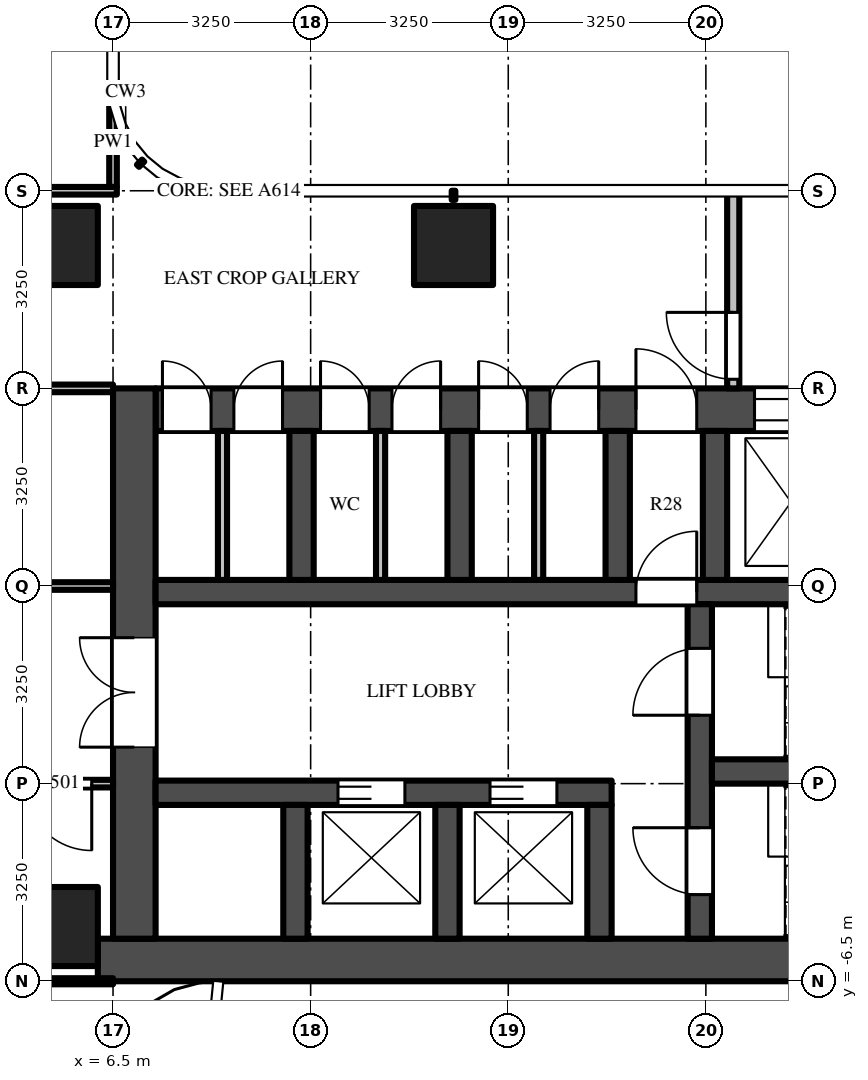
"""IFC4 building model, lengths in metres.
Left out: names, types, materials, properties, quantities, classifications, styles, units other than length and angle.
Written with IfcOpenShell. Run it as: python <this file> out.ifc"""

import sys

from ifc_helpers import new_model, si_unit, direction, frame, frame_2d, origin, origin_2d, place, context, subcontext, project, spatial, rectangle, extrude, source, transform, mapped, element, fill, save


model = new_model("IFC4")
c1 = context("Model", 3, precision=1e-05, world=origin(), true_north=direction((0.0, 1.0)))
c2 = subcontext(c1, "Body", "Model", "MODEL_VIEW")
j1 = project(units=[si_unit("LENGTHUNIT", "METRE"), si_unit("PLANEANGLEUNIT", "RADIAN")], contexts=[c1])
p1 = place(None, origin())
s1 = spatial("IfcSite", under=j1, at=p1, CompositionType="ELEMENT")
p2 = place(p1, origin())
s2 = spatial("IfcBuilding", under=s1, at=p2, CompositionType="ELEMENT")
p3 = place(p2, frame((0.0, 0.0, 111.0)))
s3 = spatial("IfcBuildingStorey", under=s2, at=p3, CompositionType="ELEMENT", Elevation=111.0)
m1 = source(origin(), c2, "Body", "SweptSolid", [
    extrude(rectangle(XDim=1.3, YDim=1.3, at=origin_2d()), origin(), (0.0, 0.0, 1.0), 4.5),
])
for number, where, z_axis, x_axis in (
    (1, (12.1, 5.6, 0.0), (0.0, 0.0, 1.0), (1.0, 0.0, 0.0)),
    (2, (5.6, 5.6, 0.0), (0.0, 0.0, 1.0), (1.0, 0.0, 0.0)),
    (3, (5.6, -5.6, 0.0), (0.0, 0.0, 1.0), (1.0, 0.0, 0.0)),
):
    element("IfcColumn", number, at=place(p3, frame(where, z_axis=z_axis, x_axis=x_axis)), inside=s3, PredefinedType="COLUMN", context=c2, shape_type="MappedRepresentation", body=[
        mapped(m1, transform((0.0, 0.0, 0.0))),
    ])
m2 = source(origin(), c2, "Body", "SweptSolid", [
    extrude(rectangle(XDim=16.5, YDim=0.7, at=frame_2d((8.25, 0.0))), origin(), (0.0, 0.0, 1.0), 4.25),
])
p4 = place(p3, frame((6.25, -6.15, 0.0), z_axis=(0.0, 0.0, 1.0), x_axis=(1.0, 0.0, 0.0)))
e4 = element("IfcWall", 4, at=p4, inside=s3, PredefinedType="SHEAR", context=c2, shape_type="MappedRepresentation", body=[
    mapped(m2, transform((0.0, 0.0, 0.0))),
])
m3 = source(origin(), c2, "Body", "SweptSolid", [
    extrude(rectangle(XDim=14.85, YDim=0.7, at=frame_2d((7.425, 0.0))), origin(), (0.0, 0.0, 1.0), 4.25),
])
p5 = place(p3, frame((7.2, 2.9, 0.0), z_axis=(0.0, 0.0, 1.0), x_axis=(1.0, 0.0, 0.0)))
e5 = element("IfcWall", 5, at=p5, inside=s3, PredefinedType="SHEAR", context=c2, shape_type="MappedRepresentation", body=[
    mapped(m3, transform((0.0, 0.0, 0.0))),
])
m4 = source(origin(), c2, "Body", "SweptSolid", [
    extrude(rectangle(XDim=1.3, YDim=2.1, at=frame_2d((0.65, 1.05))), frame((0.0, 0.36, 0.0), z_axis=(0.0, -1.0, 0.0), x_axis=(1.0, 0.0, 0.0)), (0.0, 0.0, 1.0), 0.72),
])
p6 = place(p5, frame((12.2, 0.0, 0.0)))
e6 = element("IfcOpeningElement", 6, at=p6, cuts=e5, PredefinedType="OPENING", context=c2, shape_type="MappedRepresentation", body=[
    mapped(m4, transform((0.0, 0.0, 0.0))),
])
m5 = source(origin(), c2, "Body", "SweptSolid", [
    extrude(rectangle(XDim=1.2, YDim=2.1, at=frame_2d((0.6, 1.05))), frame((0.0, 0.36, 0.0), z_axis=(0.0, -1.0, 0.0), x_axis=(1.0, 0.0, 0.0)), (0.0, 0.0, 1.0), 0.72),
])
p7 = place(p5, frame((9.85, 0.0, 0.0)))
e7 = element("IfcOpeningElement", 7, at=p7, cuts=e5, PredefinedType="OPENING", context=c2, shape_type="MappedRepresentation", body=[
    mapped(m5, transform((0.0, 0.0, 0.0))),
])
m6 = source(origin(), c2, "Body", "SweptSolid", [
    extrude(rectangle(XDim=1.0, YDim=2.1, at=frame_2d((0.5, 1.05))), frame((0.0, 0.36, 0.0), z_axis=(0.0, -1.0, 0.0), x_axis=(1.0, 0.0, 0.0)), (0.0, 0.0, 1.0), 0.72),
])
p8 = place(p5, frame((7.9, 0.0, 0.0)))
e8 = element("IfcOpeningElement", 8, at=p8, cuts=e5, PredefinedType="OPENING", context=c2, shape_type="MappedRepresentation", body=[
    mapped(m6, transform((0.0, 0.0, 0.0))),
])
m7 = source(origin(), c2, "Body", "SweptSolid", [
    extrude(rectangle(XDim=0.8, YDim=2.1, at=frame_2d((0.4, 1.05))), frame((0.0, 0.36, 0.0), z_axis=(0.0, -1.0, 0.0), x_axis=(1.0, 0.0, 0.0)), (0.0, 0.0, 1.0), 0.72),
])
p9 = place(p5, frame((0.113, 0.0, 0.0)))
e9 = element("IfcOpeningElement", 9, at=p9, cuts=e5, PredefinedType="OPENING", context=c2, shape_type="MappedRepresentation", body=[
    mapped(m7, transform((0.0, 0.0, 0.0))),
])
p10 = place(p5, frame((1.288, 0.0, 0.0)))
e10 = element("IfcOpeningElement", 10, at=p10, cuts=e5, PredefinedType="OPENING", context=c2, shape_type="MappedRepresentation", body=[
    mapped(m7, transform((0.0, 0.0, 0.0))),
])
p11 = place(p5, frame((2.712, 0.0, 0.0)))
e11 = element("IfcOpeningElement", 11, at=p11, cuts=e5, PredefinedType="OPENING", context=c2, shape_type="MappedRepresentation", body=[
    mapped(m7, transform((0.0, 0.0, 0.0))),
])
p12 = place(p5, frame((3.887, 0.0, 0.0)))
e12 = element("IfcOpeningElement", 12, at=p12, cuts=e5, PredefinedType="OPENING", context=c2, shape_type="MappedRepresentation", body=[
    mapped(m7, transform((0.0, 0.0, 0.0))),
])
p13 = place(p5, frame((5.312, 0.0, 0.0)))
e13 = element("IfcOpeningElement", 13, at=p13, cuts=e5, PredefinedType="OPENING", context=c2, shape_type="MappedRepresentation", body=[
    mapped(m7, transform((0.0, 0.0, 0.0))),
])
p14 = place(p5, frame((6.488, 0.0, 0.0)))
e14 = element("IfcOpeningElement", 14, at=p14, cuts=e5, PredefinedType="OPENING", context=c2, shape_type="MappedRepresentation", body=[
    mapped(m7, transform((0.0, 0.0, 0.0))),
])
m8 = source(origin(), c2, "Body", "SweptSolid", [
    extrude(rectangle(XDim=9.05, YDim=0.7, at=frame_2d((4.525, 0.0))), origin(), (0.0, 0.0, 1.0), 4.25),
])
p15 = place(p3, frame((6.85, -5.8, 0.0), z_axis=(0.0, 0.0, 1.0), x_axis=(0.0, 1.0, 0.0)))
e15 = element("IfcWall", 15, at=p15, inside=s3, PredefinedType="SHEAR", context=c2, shape_type="MappedRepresentation", body=[
    mapped(m8, transform((0.0, 0.0, 0.0))),
])
m9 = source(origin(), c2, "Body", "SweptSolid", [
    extrude(rectangle(XDim=1.8, YDim=2.1, at=frame_2d((0.9, 1.05))), frame((0.0, 0.36, 0.0), z_axis=(0.0, -1.0, 0.0), x_axis=(1.0, 0.0, 0.0)), (0.0, 0.0, 1.0), 0.72),
])
p16 = place(p15, frame((3.15, 0.0, 0.0)))
e16 = element("IfcOpeningElement", 16, at=p16, cuts=e15, PredefinedType="OPENING", context=c2, shape_type="MappedRepresentation", body=[
    mapped(m9, transform((0.0, 0.0, 0.0))),
])
m10 = source(origin(), c2, "Body", "SweptSolid", [
    extrude(rectangle(XDim=7.5, YDim=0.4, at=frame_2d((3.75, 0.0))), origin(), (0.0, 0.0, 1.0), 4.25),
])
p17 = place(p3, frame((7.2, -3.4, 0.0), z_axis=(0.0, 0.0, 1.0), x_axis=(1.0, 0.0, 0.0)))
e17 = element("IfcWall", 17, at=p17, inside=s3, PredefinedType="SHEAR", context=c2, shape_type="MappedRepresentation", body=[
    mapped(m10, transform((0.0, 0.0, 0.0))),
])
m11 = source(origin(), c2, "Body", "SweptSolid", [
    extrude(rectangle(XDim=1.1, YDim=2.1, at=frame_2d((0.55, 1.05))), frame((0.0, 0.21, 0.0), z_axis=(0.0, -1.0, 0.0), x_axis=(1.0, 0.0, 0.0)), (0.0, 0.0, 1.0), 0.42),
])
p18 = place(p17, frame((3.0, 0.0, 0.0)))
e18 = element("IfcOpeningElement", 18, at=p18, cuts=e17, PredefinedType="OPENING", context=c2, shape_type="MappedRepresentation", body=[
    mapped(m11, transform((0.0, 0.0, 0.0))),
])
p19 = place(p17, frame((5.5, 0.0, 0.0)))
e19 = element("IfcOpeningElement", 19, at=p19, cuts=e17, PredefinedType="OPENING", context=c2, shape_type="MappedRepresentation", body=[
    mapped(m11, transform((0.0, 0.0, 0.0))),
])
m12 = source(origin(), c2, "Body", "SweptSolid", [
    extrude(rectangle(XDim=14.85, YDim=0.4, at=frame_2d((7.425, 0.0))), origin(), (0.0, 0.0, 1.0), 4.25),
])
p20 = place(p3, frame((7.2, -0.1, 0.0), z_axis=(0.0, 0.0, 1.0), x_axis=(1.0, 0.0, 0.0)))
e20 = element("IfcWall", 20, at=p20, inside=s3, PredefinedType="SHEAR", context=c2, shape_type="MappedRepresentation", body=[
    mapped(m12, transform((0.0, 0.0, 0.0))),
])
m13 = source(origin(), c2, "Body", "SweptSolid", [
    extrude(rectangle(XDim=1.0, YDim=2.1, at=frame_2d((0.5, 1.05))), frame((0.0, 0.21, 0.0), z_axis=(0.0, -1.0, 0.0), x_axis=(1.0, 0.0, 0.0)), (0.0, 0.0, 1.0), 0.42),
])
p21 = place(p20, frame((7.9, 0.0, 0.0)))
e21 = element("IfcOpeningElement", 21, at=p21, cuts=e20, PredefinedType="OPENING", context=c2, shape_type="MappedRepresentation", body=[
    mapped(m13, transform((0.0, 0.0, 0.0))),
])
m14 = source(origin(), c2, "Body", "SweptSolid", [
    extrude(rectangle(XDim=5.5, YDim=0.4, at=frame_2d((2.75, 0.0))), origin(), (0.0, 0.0, 1.0), 4.25),
])
p22 = place(p3, frame((16.15, -5.8, 0.0), z_axis=(0.0, 0.0, 1.0), x_axis=(0.0, 1.0, 0.0)))
e22 = element("IfcWall", 22, at=p22, inside=s3, PredefinedType="SHEAR", context=c2, shape_type="MappedRepresentation", body=[
    mapped(m14, transform((0.0, 0.0, 0.0))),
])
p23 = place(p22, frame((0.725, 0.0, 0.0)))
e23 = element("IfcOpeningElement", 23, at=p23, cuts=e22, PredefinedType="OPENING", context=c2, shape_type="MappedRepresentation", body=[
    mapped(m11, transform((0.0, 0.0, 0.0))),
])
p24 = place(p22, frame((3.675, 0.0, 0.0)))
e24 = element("IfcOpeningElement", 24, at=p24, cuts=e22, PredefinedType="OPENING", context=c2, shape_type="MappedRepresentation", body=[
    mapped(m11, transform((0.0, 0.0, 0.0))),
])
m15 = source(origin(), c2, "Body", "SweptSolid", [
    extrude(rectangle(XDim=5.7, YDim=0.4, at=frame_2d((2.85, 0.0))), origin(), (0.0, 0.0, 1.0), 4.25),
])
p25 = place(p3, frame((16.35, -3.05, 0.0), z_axis=(0.0, 0.0, 1.0), x_axis=(1.0, 0.0, 0.0)))
e25 = element("IfcWall", 25, at=p25, inside=s3, PredefinedType="SHEAR", context=c2, shape_type="MappedRepresentation", body=[
    mapped(m15, transform((0.0, 0.0, 0.0))),
])
m16 = source(origin(), c2, "Body", "SweptSolid", [
    extrude(rectangle(XDim=2.2, YDim=0.4, at=frame_2d((1.1, 0.0))), origin(), (0.0, 0.0, 1.0), 4.25),
])
for number, where, z_axis, x_axis in (
    (26, (9.5, -5.8, 0.0), (0.0, 0.0, 1.0), (0.0, 1.0, 0.0)),
    (27, (12.0, -5.8, 0.0), (0.0, 0.0, 1.0), (0.0, 1.0, 0.0)),
    (28, (14.5, -5.8, 0.0), (0.0, 0.0, 1.0), (0.0, 1.0, 0.0)),
):
    element("IfcWall", number, at=place(p3, frame(where, z_axis=z_axis, x_axis=x_axis)), inside=s3, PredefinedType="SHEAR", context=c2, shape_type="MappedRepresentation", body=[
        mapped(m16, transform((0.0, 0.0, 0.0))),
    ])
m17 = source(origin(), c2, "Body", "SweptSolid", [
    extrude(rectangle(XDim=2.45, YDim=0.4, at=frame_2d((1.225, 0.0))), origin(), (0.0, 0.0, 1.0), 4.25),
])
for number, where, z_axis, x_axis in (
    (29, (9.6, 0.1, 0.0), (0.0, 0.0, 1.0), (0.0, 1.0, 0.0)),
    (30, (12.2, 0.1, 0.0), (0.0, 0.0, 1.0), (0.0, 1.0, 0.0)),
    (31, (14.8, 0.1, 0.0), (0.0, 0.0, 1.0), (0.0, 1.0, 0.0)),
    (32, (16.4, 0.1, 0.0), (0.0, 0.0, 1.0), (0.0, 1.0, 0.0)),
):
    element("IfcWall", number, at=place(p3, frame(where, z_axis=z_axis, x_axis=x_axis)), inside=s3, PredefinedType="SHEAR", context=c2, shape_type="MappedRepresentation", body=[
        mapped(m17, transform((0.0, 0.0, 0.0))),
    ])
m18 = source(origin(), c2, "Body", "SweptSolid", [
    extrude(rectangle(XDim=3.25, YDim=0.2, at=frame_2d((1.625, 0.0))), origin(), (0.0, 0.0, 1.0), 4.25),
])
p26 = place(p3, frame((16.7, 3.25, 0.0), z_axis=(0.0, 0.0, 1.0), x_axis=(0.0, 1.0, 0.0)))
e33 = element("IfcWall", 33, at=p26, inside=s3, PredefinedType="PARTITIONING", context=c2, shape_type="MappedRepresentation", body=[
    mapped(m18, transform((0.0, 0.0, 0.0))),
])
m19 = source(origin(), c2, "Body", "SweptSolid", [
    extrude(rectangle(XDim=1.1, YDim=2.1, at=frame_2d((0.55, 1.05))), frame((0.0, 0.11, 0.0), z_axis=(0.0, -1.0, 0.0), x_axis=(1.0, 0.0, 0.0)), (0.0, 0.0, 1.0), 0.22),
])
p27 = place(p26, frame((0.15, 0.0, 0.0)))
e34 = element("IfcOpeningElement", 34, at=p27, cuts=e33, PredefinedType="OPENING", context=c2, shape_type="MappedRepresentation", body=[
    mapped(m19, transform((0.0, 0.0, 0.0))),
])
m20 = source(origin(), c2, "Body", "SweptSolid", [
    extrude(rectangle(XDim=2.45, YDim=0.15, at=frame_2d((1.225, 0.0))), origin(), (0.0, 0.0, 1.0), 4.25),
])
for number, where, z_axis, x_axis in (
    (35, (8.3, 0.1, 0.0), (0.0, 0.0, 1.0), (0.0, 1.0, 0.0)),
    (36, (10.9, 0.1, 0.0), (0.0, 0.0, 1.0), (0.0, 1.0, 0.0)),
    (37, (13.5, 0.1, 0.0), (0.0, 0.0, 1.0), (0.0, 1.0, 0.0)),
):
    element("IfcWall", number, at=place(p3, frame(where, z_axis=z_axis, x_axis=x_axis)), inside=s3, PredefinedType="PARTITIONING", context=c2, shape_type="MappedRepresentation", body=[
        mapped(m20, transform((0.0, 0.0, 0.0))),
    ])
m21 = source(origin(), c2, "Body", "SweptSolid", [
    extrude(rectangle(XDim=1.469, YDim=0.125, at=frame_2d((0.734, 0.0))), origin(), (0.0, 0.0, 1.0), 4.25),
])
p28 = place(p3, frame((6.5, 6.562, 0.0), z_axis=(0.0, 0.0, 1.0), x_axis=(0.0, 1.0, 0.0)))
e38 = element("IfcWall", 38, at=p28, inside=s3, PredefinedType="PARTITIONING", context=c2, shape_type="MappedRepresentation", body=[
    mapped(m21, transform((0.0, 0.0, 0.0))),
])
m22 = source(origin(), c2, "Body", "SweptSolid", [
    extrude(rectangle(XDim=5.238, YDim=0.1, at=frame_2d((2.619, 0.0))), origin(), (0.0, 0.0, 1.0), 3.33),
])
p29 = place(p3, frame((1.262, -6.5, 0.0), z_axis=(0.0, 0.0, 1.0), x_axis=(1.0, 0.0, 0.0)))
e39 = element("IfcWall", 39, at=p29, inside=s3, PredefinedType="PARTITIONING", context=c2, shape_type="MappedRepresentation", body=[
    mapped(m22, transform((0.0, 0.0, 0.0))),
])
m23 = source(origin(), c2, "Body", "SweptSolid", [
    extrude(rectangle(XDim=5.363, YDim=0.125, at=frame_2d((2.681, 0.0))), origin(), (0.0, 0.0, 1.0), 3.468),
])
p30 = place(p3, frame((6.5, -3.25, 0.0), z_axis=(0.0, 0.0, 1.0), x_axis=(-1.0, 0.0, 0.0)))
e40 = element("IfcWall", 40, at=p30, inside=s3, PredefinedType="PARTITIONING", context=c2, shape_type="MappedRepresentation", body=[
    mapped(m23, transform((0.0, 0.0, 0.0))),
])
m24 = source(origin(), c2, "Body", "SweptSolid", [
    extrude(rectangle(XDim=1.1, YDim=2.1, at=frame_2d((0.55, 1.05))), frame((0.0, 0.073, 0.0), z_axis=(0.0, -1.0, 0.0), x_axis=(1.0, 0.0, 0.0)), (0.0, 0.0, 1.0), 0.145),
])
p31 = place(p30, frame((0.35, 0.0, 0.0)))
e41 = element("IfcOpeningElement", 41, at=p31, cuts=e40, PredefinedType="OPENING", context=c2, shape_type="MappedRepresentation", body=[
    mapped(m24, transform((0.0, 0.0, 0.0))),
])
p32 = place(p3, frame((6.5, 0.0, 0.0), z_axis=(0.0, 0.0, 1.0), x_axis=(-1.0, 0.0, 0.0)))
e42 = element("IfcWall", 42, at=p32, inside=s3, PredefinedType="PARTITIONING", context=c2, shape_type="MappedRepresentation", body=[
    mapped(m23, transform((0.0, 0.0, 0.0))),
])
m25 = source(origin(), c2, "Body", "SweptSolid", [
    extrude(rectangle(XDim=1.0, YDim=2.1, at=frame_2d((0.5, 1.05))), frame((0.0, 0.073, 0.0), z_axis=(0.0, -1.0, 0.0), x_axis=(1.0, 0.0, 0.0)), (0.0, 0.0, 1.0), 0.145),
])
p33 = place(p32, frame((3.95, 0.0, 0.0)))
e43 = element("IfcOpeningElement", 43, at=p33, cuts=e42, PredefinedType="OPENING", context=c2, shape_type="MappedRepresentation", body=[
    mapped(m25, transform((0.0, 0.0, 0.0))),
])
p34 = place(p3, frame((1.137, 3.25, 0.0), z_axis=(0.0, 0.0, 1.0), x_axis=(1.0, 0.0, 0.0)))
e44 = element("IfcWall", 44, at=p34, inside=s3, PredefinedType="PARTITIONING", context=c2, shape_type="MappedRepresentation", body=[
    mapped(m23, transform((0.0, 0.0, 0.0))),
])
m26 = source(origin(), c2, "Body", "SweptSolid", [
    extrude(rectangle(XDim=5.425, YDim=0.125, at=frame_2d((2.712, 0.0))), origin(), (0.0, 0.0, 1.0), 3.33),
])
p35 = place(p3, frame((1.137, 6.5, 0.0), z_axis=(0.0, 0.0, 1.0), x_axis=(1.0, 0.0, 0.0)))
e45 = element("IfcWall", 45, at=p35, inside=s3, PredefinedType="PARTITIONING", context=c2, shape_type="MappedRepresentation", body=[
    mapped(m26, transform((0.0, 0.0, 0.0))),
])
m27 = source(origin(), c2, "Body", "SweptSolid", [
    extrude(rectangle(XDim=1.1, YDim=2.1, at=frame_2d((0.55, 1.05))), frame((0.0, 0.025, 0.0), z_axis=(0.0, -1.0, 0.0), x_axis=(1.0, 0.0, 0.0)), (0.0, 0.0, 1.0), 0.05),
])
p36 = place(p18, origin())
e46 = element("IfcDoor", 46, at=p36, inside=s3, OperationType="DOUBLE_DOOR_SLIDING", PredefinedType="DOOR", context=c2, shape_type="MappedRepresentation", body=[
    mapped(m27, transform((0.0, 0.0, 0.0))),
])
fill(e18, e46)
p37 = place(p19, origin())
e47 = element("IfcDoor", 47, at=p37, inside=s3, OperationType="DOUBLE_DOOR_SLIDING", PredefinedType="DOOR", context=c2, shape_type="MappedRepresentation", body=[
    mapped(m27, transform((0.0, 0.0, 0.0))),
])
fill(e19, e47)
m28 = source(origin(), c2, "Body", "SweptSolid", [
    extrude(rectangle(XDim=1.2, YDim=2.1, at=frame_2d((0.6, 1.05))), frame((0.0, -0.275, 0.0), z_axis=(0.0, -1.0, 0.0), x_axis=(1.0, 0.0, 0.0)), (0.0, 0.0, 1.0), 0.05),
])
p38 = place(p7, origin())
e48 = element("IfcDoor", 48, at=p38, inside=s3, OperationType="DOUBLE_DOOR_SLIDING", PredefinedType="DOOR", context=c2, shape_type="MappedRepresentation", body=[
    mapped(m28, transform((0.0, 0.0, 0.0))),
])
fill(e7, e48)
m29 = source(origin(), c2, "Body", "SweptSolid", [
    extrude(rectangle(XDim=1.8, YDim=2.1, at=frame_2d((0.9, 1.05))), frame((0.0, -0.275, 0.0), z_axis=(0.0, -1.0, 0.0), x_axis=(1.0, 0.0, 0.0)), (0.0, 0.0, 1.0), 0.05),
])
p39 = place(p16, origin())
e49 = element("IfcDoor", 49, at=p39, inside=s3, OperationType="DOUBLE_DOOR_SINGLE_SWING", PredefinedType="DOOR", context=c2, shape_type="MappedRepresentation", body=[
    mapped(m29, transform((0.0, 0.0, 0.0))),
])
fill(e16, e49)
p40 = place(p23, origin())
e50 = element("IfcDoor", 50, at=p40, inside=s3, OperationType="SINGLE_SWING_RIGHT", PredefinedType="DOOR", context=c2, shape_type="MappedRepresentation", body=[
    mapped(m27, transform((0.0, 0.0, 0.0))),
])
fill(e23, e50)
p41 = place(p24, origin())
e51 = element("IfcDoor", 51, at=p41, inside=s3, OperationType="SINGLE_SWING_LEFT", PredefinedType="DOOR", context=c2, shape_type="MappedRepresentation", body=[
    mapped(m27, transform((0.0, 0.0, 0.0))),
])
fill(e24, e51)
m30 = source(origin(), c2, "Body", "SweptSolid", [
    extrude(rectangle(XDim=1.0, YDim=2.1, at=frame_2d((0.5, 1.05))), frame((0.0, 0.025, 0.0), z_axis=(0.0, -1.0, 0.0), x_axis=(1.0, 0.0, 0.0)), (0.0, 0.0, 1.0), 0.05),
])
p42 = place(p21, origin())
e52 = element("IfcDoor", 52, at=p42, inside=s3, OperationType="SINGLE_SWING_RIGHT", PredefinedType="DOOR", context=c2, shape_type="MappedRepresentation", body=[
    mapped(m30, transform((0.0, 0.0, 0.0))),
])
fill(e21, e52)
m31 = source(origin(), c2, "Body", "SweptSolid", [
    extrude(rectangle(XDim=1.0, YDim=2.1, at=frame_2d((0.5, 1.05))), frame((0.0, -0.275, 0.0), z_axis=(0.0, -1.0, 0.0), x_axis=(1.0, 0.0, 0.0)), (0.0, 0.0, 1.0), 0.05),
])
p43 = place(p8, origin())
e53 = element("IfcDoor", 53, at=p43, inside=s3, OperationType="SINGLE_SWING_LEFT", PredefinedType="DOOR", context=c2, shape_type="MappedRepresentation", body=[
    mapped(m31, transform((0.0, 0.0, 0.0))),
])
fill(e8, e53)
p44 = place(p27, origin())
e54 = element("IfcDoor", 54, at=p44, inside=s3, OperationType="SINGLE_SWING_RIGHT", PredefinedType="DOOR", context=c2, shape_type="MappedRepresentation", body=[
    mapped(m27, transform((0.0, 0.0, 0.0))),
])
fill(e34, e54)
m32 = source(origin(), c2, "Body", "SweptSolid", [
    extrude(rectangle(XDim=0.8, YDim=2.1, at=frame_2d((0.4, 1.05))), frame((0.0, -0.275, 0.0), z_axis=(0.0, -1.0, 0.0), x_axis=(1.0, 0.0, 0.0)), (0.0, 0.0, 1.0), 0.05),
])
p45 = place(p9, origin())
e55 = element("IfcDoor", 55, at=p45, inside=s3, OperationType="SINGLE_SWING_LEFT", PredefinedType="DOOR", context=c2, shape_type="MappedRepresentation", body=[
    mapped(m32, transform((0.0, 0.0, 0.0))),
])
fill(e9, e55)
p46 = place(p10, origin())
e56 = element("IfcDoor", 56, at=p46, inside=s3, OperationType="SINGLE_SWING_RIGHT", PredefinedType="DOOR", context=c2, shape_type="MappedRepresentation", body=[
    mapped(m32, transform((0.0, 0.0, 0.0))),
])
fill(e10, e56)
p47 = place(p11, origin())
e57 = element("IfcDoor", 57, at=p47, inside=s3, OperationType="SINGLE_SWING_LEFT", PredefinedType="DOOR", context=c2, shape_type="MappedRepresentation", body=[
    mapped(m32, transform((0.0, 0.0, 0.0))),
])
fill(e11, e57)
p48 = place(p12, origin())
e58 = element("IfcDoor", 58, at=p48, inside=s3, OperationType="SINGLE_SWING_RIGHT", PredefinedType="DOOR", context=c2, shape_type="MappedRepresentation", body=[
    mapped(m32, transform((0.0, 0.0, 0.0))),
])
fill(e12, e58)
p49 = place(p13, origin())
e59 = element("IfcDoor", 59, at=p49, inside=s3, OperationType="SINGLE_SWING_LEFT", PredefinedType="DOOR", context=c2, shape_type="MappedRepresentation", body=[
    mapped(m32, transform((0.0, 0.0, 0.0))),
])
fill(e13, e59)
p50 = place(p14, origin())
e60 = element("IfcDoor", 60, at=p50, inside=s3, OperationType="SINGLE_SWING_RIGHT", PredefinedType="DOOR", context=c2, shape_type="MappedRepresentation", body=[
    mapped(m32, transform((0.0, 0.0, 0.0))),
])
fill(e14, e60)
p51 = place(p31, origin())
e61 = element("IfcDoor", 61, at=p51, inside=s3, OperationType="SINGLE_SWING_LEFT", PredefinedType="DOOR", context=c2, shape_type="MappedRepresentation", body=[
    mapped(m27, transform((0.0, 0.0, 0.0))),
])
fill(e41, e61)
save(model, sys.argv[1])
